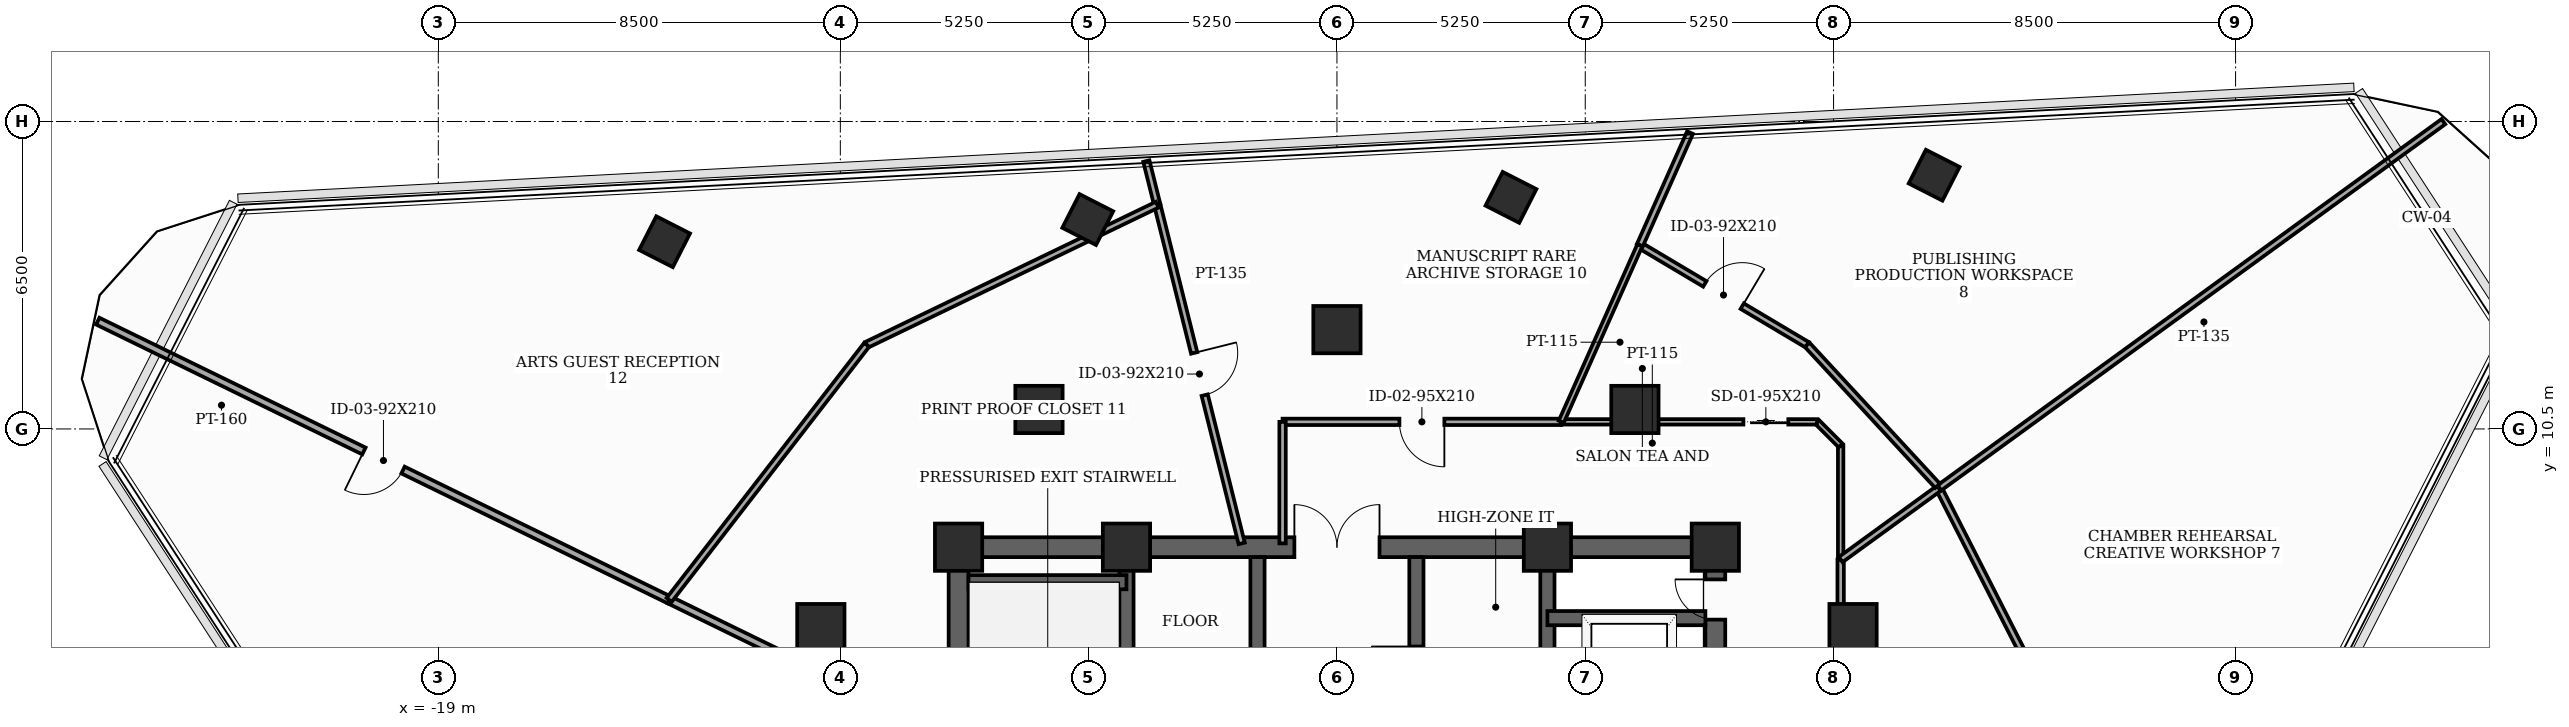
"""IFC4 building model, lengths in metres.
Left out: names, types, materials, properties, quantities, classifications, styles, units other than length and angle.
Written with IfcOpenShell. Run it as: python <this file> out.ifc"""

import sys

from ifc_helpers import new_model, si_unit, direction, frame, frame_2d, origin, origin_2d, place, context, subcontext, project, spatial, rectangle, extrude, element, fill, save


model = new_model("IFC4")
c1 = context("Model", 3, precision=1e-05, world=origin(), true_north=direction((0.0, 1.0)))
c2 = subcontext(c1, "Body", "Model", "MODEL_VIEW")
j1 = project(units=[si_unit("LENGTHUNIT", "METRE"), si_unit("PLANEANGLEUNIT", "RADIAN")], contexts=[c1])
p1 = place(None, origin())
s1 = spatial("IfcSite", under=j1, at=p1, CompositionType="ELEMENT")
p2 = place(p1, origin())
s2 = spatial("IfcBuilding", under=s1, at=p2, CompositionType="ELEMENT")
p3 = place(p2, frame((0.0, 0.0, 252.2)))
s3 = spatial("IfcBuildingStorey", under=s2, at=p3, CompositionType="ELEMENT", Elevation=252.2)
for number, where, z_axis, x_axis in (
    (1, (8.0, 8.0, 0.0), (0.0, 0.0, 1.0), (1.0, 0.0, 0.0)),
    (2, (4.45, 8.0, 0.0), (0.0, 0.0, 1.0), (1.0, 0.0, 0.0)),
    (3, (-4.45, 8.0, 0.0), (0.0, 0.0, 1.0), (1.0, 0.0, 0.0)),
    (4, (-8.0, 8.0, 0.0), (0.0, 0.0, 1.0), (1.0, 0.0, 0.0)),
    (5, (10.912, 6.3, 0.0), (0.0, 0.0, 1.0), (1.0, 0.0, 0.0)),
    (6, (6.3, 10.912, 0.0), (0.0, 0.0, 1.0), (1.0, 0.0, 0.0)),
    (7, (0.0, 12.6, 0.0), (0.0, 0.0, 1.0), (1.0, 0.0, 0.0)),
    (8, (-6.3, 10.912, 0.0), (0.0, 0.0, 1.0), (1.0, 0.0, 0.0)),
    (9, (-10.912, 6.3, 0.0), (0.0, 0.0, 1.0), (1.0, 0.0, 0.0)),
):
    element("IfcColumn", number, at=place(p3, frame(where, z_axis=z_axis, x_axis=x_axis)), inside=s3, PredefinedType="COLUMN", context=c2, shape_type="SweptSolid", body=[
        extrude(rectangle(XDim=1.0, YDim=1.0, at=origin_2d()), origin(), (0.0, 0.0, 1.0), 3.7),
    ])
for number, where, z_axis, x_axis in (
    (10, (12.627, 15.865, 0.0), (0.0, 0.0, 1.0), (0.454, 0.891, 0.0)),
    (11, (3.679, 15.396, 0.0), (0.0, 0.0, 1.0), (0.454, 0.891, 0.0)),
    (12, (-5.269, 14.927, 0.0), (0.0, 0.0, 1.0), (0.454, 0.891, 0.0)),
    (13, (-14.216, 14.458, 0.0), (0.0, 0.0, 1.0), (0.454, 0.891, 0.0)),
):
    element("IfcColumn", number, at=place(p3, frame(where, z_axis=z_axis, x_axis=x_axis)), inside=s3, PredefinedType="COLUMN", context=c2, shape_type="SweptSolid", body=[
        extrude(rectangle(XDim=0.8, YDim=0.8, at=origin_2d()), origin(), (0.0, 0.0, 1.0), 3.7),
    ])
p4 = place(p3, frame((-8.0, -8.0, 0.0), z_axis=(0.0, 0.0, 1.0), x_axis=(0.0, 1.0, 0.0)))
e14 = element("IfcWall", 14, at=p4, inside=s3, PredefinedType="SHEAR", context=c2, shape_type="SweptSolid", body=[
    extrude(rectangle(XDim=16.0, YDim=0.42, at=frame_2d((8.0, 0.0))), origin(), (0.0, 0.0, 1.0), 3.5),
])
p5 = place(p4, frame((0.681, 0.0, 0.0)))
e15 = element("IfcOpeningElement", 15, at=p5, cuts=e14, PredefinedType="OPENING", context=c2, shape_type="SweptSolid", body=[
    extrude(rectangle(XDim=0.85, YDim=2.02, at=frame_2d((0.425, 1.01))), frame((0.0, 0.22, 0.0), z_axis=(0.0, -1.0, 0.0), x_axis=(1.0, 0.0, 0.0)), (0.0, 0.0, 1.0), 0.44),
])
p6 = place(p4, frame((5.35, 0.0, 0.0)))
e16 = element("IfcOpeningElement", 16, at=p6, cuts=e14, PredefinedType="OPENING", context=c2, shape_type="SweptSolid", body=[
    extrude(rectangle(XDim=1.05, YDim=2.15, at=frame_2d((0.525, 1.075))), frame((0.0, 0.22, 0.0), z_axis=(0.0, -1.0, 0.0), x_axis=(1.0, 0.0, 0.0)), (0.0, 0.0, 1.0), 0.44),
])
p7 = place(p3, frame((8.0, -8.0, 0.0), z_axis=(0.0, 0.0, 1.0), x_axis=(0.0, 1.0, 0.0)))
e17 = element("IfcWall", 17, at=p7, inside=s3, PredefinedType="SHEAR", context=c2, shape_type="SweptSolid", body=[
    extrude(rectangle(XDim=16.0, YDim=0.42, at=frame_2d((8.0, 0.0))), origin(), (0.0, 0.0, 1.0), 3.5),
])
p8 = place(p7, frame((9.6, 0.0, 0.0)))
e18 = element("IfcOpeningElement", 18, at=p8, cuts=e17, PredefinedType="OPENING", context=c2, shape_type="SweptSolid", body=[
    extrude(rectangle(XDim=1.05, YDim=2.15, at=frame_2d((0.525, 1.075))), frame((0.0, 0.22, 0.0), z_axis=(0.0, -1.0, 0.0), x_axis=(1.0, 0.0, 0.0)), (0.0, 0.0, 1.0), 0.44),
])
p9 = place(p7, frame((14.469, 0.0, 0.0)))
e19 = element("IfcOpeningElement", 19, at=p9, cuts=e17, PredefinedType="OPENING", context=c2, shape_type="SweptSolid", body=[
    extrude(rectangle(XDim=0.85, YDim=2.02, at=frame_2d((0.425, 1.01))), frame((0.0, 0.22, 0.0), z_axis=(0.0, -1.0, 0.0), x_axis=(1.0, 0.0, 0.0)), (0.0, 0.0, 1.0), 0.44),
])
p10 = place(p3, frame((-8.0, 8.0, 0.0), z_axis=(0.0, 0.0, 1.0), x_axis=(1.0, 0.0, 0.0)))
e20 = element("IfcWall", 20, at=p10, inside=s3, PredefinedType="SHEAR", context=c2, shape_type="SweptSolid", body=[
    extrude(rectangle(XDim=16.0, YDim=0.42, at=frame_2d((8.0, 0.0))), origin(), (0.0, 0.0, 1.0), 3.5),
])
p11 = place(p10, frame((7.1, 0.0, 0.0)))
e21 = element("IfcOpeningElement", 21, at=p11, cuts=e20, PredefinedType="OPENING", context=c2, shape_type="SweptSolid", body=[
    extrude(rectangle(XDim=1.8, YDim=2.15, at=frame_2d((0.9, 1.075))), frame((0.0, 0.22, 0.0), z_axis=(0.0, -1.0, 0.0), x_axis=(1.0, 0.0, 0.0)), (0.0, 0.0, 1.0), 0.44),
])
for number, where, z_axis, x_axis in (
    (22, (-4.45, -7.79, 0.0), (0.0, 0.0, 1.0), (0.0, 1.0, 0.0)),
    (23, (4.45, -7.79, 0.0), (0.0, 0.0, 1.0), (0.0, 1.0, 0.0)),
):
    element("IfcWall", number, at=place(p3, frame(where, z_axis=z_axis, x_axis=x_axis)), inside=s3, PredefinedType="SHEAR", context=c2, shape_type="SweptSolid", body=[
        extrude(rectangle(XDim=15.58, YDim=0.3, at=frame_2d((7.79, 0.0))), origin(), (0.0, 0.0, 1.0), 3.5),
    ])
for number, where, z_axis, x_axis in (
    (24, (-7.79, 7.26, 0.0), (0.0, 0.0, 1.0), (1.0, 0.0, 0.0)),
    (25, (4.45, 6.5, 0.0), (0.0, 0.0, 1.0), (1.0, 0.0, 0.0)),
):
    element("IfcWall", number, at=place(p3, frame(where, z_axis=z_axis, x_axis=x_axis)), inside=s3, PredefinedType="SHEAR", context=c2, shape_type="SweptSolid", body=[
        extrude(rectangle(XDim=3.34, YDim=0.3, at=frame_2d((1.67, 0.0))), origin(), (0.0, 0.0, 1.0), 3.5),
    ])
p12 = place(p3, frame((-1.68, -4.85, 0.0), z_axis=(0.0, 0.0, 1.0), x_axis=(0.0, 1.0, 0.0)))
e26 = element("IfcWall", 26, at=p12, inside=s3, PredefinedType="SHEAR", context=c2, shape_type="SweptSolid", body=[
    extrude(rectangle(XDim=12.64, YDim=0.3, at=frame_2d((6.32, 0.0))), origin(), (0.0, 0.0, 1.0), 3.5),
])
p13 = place(p12, frame((2.6, 0.0, 0.0)))
e27 = element("IfcOpeningElement", 27, at=p13, cuts=e26, PredefinedType="OPENING", context=c2, shape_type="SweptSolid", body=[
    extrude(rectangle(XDim=0.95, YDim=2.1, at=frame_2d((0.475, 1.05))), frame((0.0, 0.16, 0.0), z_axis=(0.0, -1.0, 0.0), x_axis=(1.0, 0.0, 0.0)), (0.0, 0.0, 1.0), 0.32),
])
p14 = place(p12, frame((8.8, 0.0, 0.0)))
e28 = element("IfcOpeningElement", 28, at=p14, cuts=e26, PredefinedType="OPENING", context=c2, shape_type="SweptSolid", body=[
    extrude(rectangle(XDim=0.95, YDim=2.1, at=frame_2d((0.475, 1.05))), frame((0.0, 0.16, 0.0), z_axis=(0.0, -1.0, 0.0), x_axis=(1.0, 0.0, 0.0)), (0.0, 0.0, 1.0), 0.32),
])
p15 = place(p3, frame((1.68, -4.85, 0.0), z_axis=(0.0, 0.0, 1.0), x_axis=(0.0, 1.0, 0.0)))
e29 = element("IfcWall", 29, at=p15, inside=s3, PredefinedType="SHEAR", context=c2, shape_type="SweptSolid", body=[
    extrude(rectangle(XDim=12.64, YDim=0.3, at=frame_2d((6.32, 0.0))), origin(), (0.0, 0.0, 1.0), 3.5),
])
p16 = place(p15, frame((0.55, 0.0, 0.0)))
e30 = element("IfcOpeningElement", 30, at=p16, cuts=e29, PredefinedType="OPENING", context=c2, shape_type="SweptSolid", body=[
    extrude(rectangle(XDim=1.1, YDim=2.1, at=frame_2d((0.55, 1.05))), frame((0.0, 0.16, 0.0), z_axis=(0.0, -1.0, 0.0), x_axis=(1.0, 0.0, 0.0)), (0.0, 0.0, 1.0), 0.32),
])
p17 = place(p15, frame((2.65, 0.0, 0.0)))
e31 = element("IfcOpeningElement", 31, at=p17, cuts=e29, PredefinedType="OPENING", context=c2, shape_type="SweptSolid", body=[
    extrude(rectangle(XDim=1.1, YDim=2.1, at=frame_2d((0.55, 1.05))), frame((0.0, 0.16, 0.0), z_axis=(0.0, -1.0, 0.0), x_axis=(1.0, 0.0, 0.0)), (0.0, 0.0, 1.0), 0.32),
])
p18 = place(p15, frame((4.75, 0.0, 0.0)))
e32 = element("IfcOpeningElement", 32, at=p18, cuts=e29, PredefinedType="OPENING", context=c2, shape_type="SweptSolid", body=[
    extrude(rectangle(XDim=1.1, YDim=2.1, at=frame_2d((0.55, 1.05))), frame((0.0, 0.16, 0.0), z_axis=(0.0, -1.0, 0.0), x_axis=(1.0, 0.0, 0.0)), (0.0, 0.0, 1.0), 0.32),
])
p19 = place(p15, frame((6.8, 0.0, 0.0)))
e33 = element("IfcOpeningElement", 33, at=p19, cuts=e29, PredefinedType="OPENING", context=c2, shape_type="SweptSolid", body=[
    extrude(rectangle(XDim=0.92, YDim=2.1, at=frame_2d((0.46, 1.05))), frame((0.0, 0.16, 0.0), z_axis=(0.0, -1.0, 0.0), x_axis=(1.0, 0.0, 0.0)), (0.0, 0.0, 1.0), 0.32),
])
p20 = place(p15, frame((9.8, 0.0, 0.0)))
e34 = element("IfcOpeningElement", 34, at=p20, cuts=e29, PredefinedType="OPENING", context=c2, shape_type="SweptSolid", body=[
    extrude(rectangle(XDim=0.95, YDim=2.1, at=frame_2d((0.475, 1.05))), frame((0.0, 0.16, 0.0), z_axis=(0.0, -1.0, 0.0), x_axis=(1.0, 0.0, 0.0)), (0.0, 0.0, 1.0), 0.32),
])
p21 = place(p3, frame((10.65, 4.225, 0.0), z_axis=(0.0, 0.0, 1.0), x_axis=(0.0, 1.0, 0.0)))
e35 = element("IfcWall", 35, at=p21, inside=s3, PredefinedType="PARTITIONING", context=c2, shape_type="SweptSolid", body=[
    extrude(rectangle(XDim=3.513, YDim=0.135, at=frame_2d((1.756, 0.0))), origin(), (0.0, 0.0, 1.0), 2.885),
])
p22 = place(p3, frame((10.65, 7.738, 0.0), z_axis=(0.0, 0.0, 1.0), x_axis=(0.0, 1.0, 0.0)))
e36 = element("IfcWall", 36, at=p22, inside=s3, PredefinedType="PARTITIONING", context=c2, shape_type="SweptSolid", body=[
    extrude(rectangle(XDim=2.412, YDim=0.115, at=frame_2d((1.206, 0.0))), origin(), (0.0, 0.0, 1.0), 3.5),
])
p23 = place(p3, frame((10.65, 10.15, 0.0), z_axis=(0.0, 0.0, 1.0), x_axis=(-0.707106781187, 0.707106781187, 0.0)))
e37 = element("IfcWall", 37, at=p23, inside=s3, PredefinedType="PARTITIONING", context=c2, shape_type="SweptSolid", body=[
    extrude(rectangle(XDim=0.707, YDim=0.115, at=frame_2d((0.354, 0.0))), origin(), (0.0, 0.0, 1.0), 3.5),
])
p24 = place(p3, frame((10.15, 10.65, 0.0), z_axis=(0.0, 0.0, 1.0), x_axis=(-1.0, 0.0, 0.0)))
e38 = element("IfcWall", 38, at=p24, inside=s3, PredefinedType="PARTITIONING", context=c2, shape_type="SweptSolid", body=[
    extrude(rectangle(XDim=5.408, YDim=0.115, at=frame_2d((2.704, 0.0))), origin(), (0.0, 0.0, 1.0), 2.885),
])
p25 = place(p24, frame((0.607, 0.0, 0.0)))
e39 = element("IfcOpeningElement", 39, at=p25, cuts=e38, PredefinedType="OPENING", context=c2, shape_type="SweptSolid", body=[
    extrude(rectangle(XDim=0.95, YDim=2.1, at=frame_2d((0.475, 1.05))), frame((0.0, 0.067, 0.0), z_axis=(0.0, -1.0, 0.0), x_axis=(1.0, 0.0, 0.0)), (0.0, 0.0, 1.0), 0.135),
])
p26 = place(p3, frame((4.742, 10.65, 0.0), z_axis=(0.0, 0.0, 1.0), x_axis=(-1.0, 0.0, 0.0)))
e40 = element("IfcWall", 40, at=p26, inside=s3, PredefinedType="PARTITIONING", context=c2, shape_type="SweptSolid", body=[
    extrude(rectangle(XDim=5.892, YDim=0.135, at=frame_2d((2.946, 0.0))), origin(), (0.0, 0.0, 1.0), 2.885),
])
p27 = place(p26, frame((2.471, 0.0, 0.0)))
e41 = element("IfcOpeningElement", 41, at=p27, cuts=e40, PredefinedType="OPENING", context=c2, shape_type="SweptSolid", body=[
    extrude(rectangle(XDim=0.95, YDim=2.1, at=frame_2d((0.475, 1.05))), frame((0.0, 0.077, 0.0), z_axis=(0.0, -1.0, 0.0), x_axis=(1.0, 0.0, 0.0)), (0.0, 0.0, 1.0), 0.155),
])
p28 = place(p3, frame((-1.15, 10.65, 0.0), z_axis=(0.0, 0.0, 1.0), x_axis=(0.0, -1.0, 0.0)))
e42 = element("IfcWall", 42, at=p28, inside=s3, PredefinedType="PARTITIONING", context=c2, shape_type="SweptSolid", body=[
    extrude(rectangle(XDim=2.57, YDim=0.135, at=frame_2d((1.285, 0.0))), origin(), (0.0, 0.0, 1.0), 2.885),
])
p29 = place(p3, frame((-8.08, 3.941, 0.0), z_axis=(0.0, 0.0, 1.0), x_axis=(-0.898794985177, 0.438369221798, 0.0)))
e43 = element("IfcWall", 43, at=p29, inside=s3, PredefinedType="PARTITIONING", context=c2, shape_type="SweptSolid", body=[
    extrude(rectangle(XDim=6.719, YDim=0.16, at=frame_2d((3.359, 0.0))), origin(), (0.0, 0.0, 1.0), 2.885),
])
p30 = place(p3, frame((-14.119, 6.886, 0.0), z_axis=(0.0, 0.0, 1.0), x_axis=(-0.898768620199, 0.438423274184, 0.0)))
e44 = element("IfcWall", 44, at=p30, inside=s3, PredefinedType="PARTITIONING", context=c2, shape_type="SweptSolid", body=[
    extrude(rectangle(XDim=13.442, YDim=0.16, at=frame_2d((6.721, 0.0))), origin(), (0.0, 0.0, 1.0), 3.035),
])
p31 = place(p30, frame((6.261, 0.0, 0.0)))
e45 = element("IfcOpeningElement", 45, at=p31, cuts=e44, PredefinedType="OPENING", context=c2, shape_type="SweptSolid", body=[
    extrude(rectangle(XDim=0.92, YDim=2.1, at=frame_2d((0.46, 1.05))), frame((0.0, 0.09, 0.0), z_axis=(0.0, -1.0, 0.0), x_axis=(1.0, 0.0, 0.0)), (0.0, 0.0, 1.0), 0.18),
])
p32 = place(p3, frame((15.149, 4.487, 0.0), z_axis=(0.0, 0.0, 1.0), x_axis=(-0.453912768225, 0.891046126102, 0.0)))
e46 = element("IfcWall", 46, at=p32, inside=s3, PredefinedType="PARTITIONING", context=c2, shape_type="SweptSolid", body=[
    extrude(rectangle(XDim=5.34, YDim=0.135, at=frame_2d((2.67, 0.0))), origin(), (0.0, 0.0, 1.0), 3.185),
])
p33 = place(p3, frame((12.725, 9.245, 0.0), z_axis=(0.0, 0.0, 1.0), x_axis=(-0.809135191367, -0.587622533683, 0.0)))
e47 = element("IfcWall", 47, at=p33, inside=s3, PredefinedType="PARTITIONING", context=c2, shape_type="SweptSolid", body=[
    extrude(rectangle(XDim=2.565, YDim=0.135, at=frame_2d((1.282, 0.0))), origin(), (0.0, 0.0, 1.0), 3.185),
])
p34 = place(p3, frame((23.394, 16.997, 0.0), z_axis=(0.0, 0.0, 1.0), x_axis=(-0.80901413128, -0.587789192985, 0.0)))
e48 = element("IfcWall", 48, at=p34, inside=s3, PredefinedType="PARTITIONING", context=c2, shape_type="SweptSolid", body=[
    extrude(rectangle(XDim=13.171, YDim=0.135, at=frame_2d((6.586, 0.0))), origin(), (0.0, 0.0, 1.0), 3.035),
])
p35 = place(p3, frame((6.404, 14.384, 0.0), z_axis=(0.0, 0.0, 1.0), x_axis=(0.859464079119, -0.511196143085, 0.0)))
e49 = element("IfcWall", 49, at=p35, inside=s3, PredefinedType="PARTITIONING", context=c2, shape_type="SweptSolid", body=[
    extrude(rectangle(XDim=4.118, YDim=0.135, at=frame_2d((2.059, 0.0))), origin(), (0.0, 0.0, 1.0), 3.035),
])
p36 = place(p35, frame((1.599, 0.0, 0.0)))
e50 = element("IfcOpeningElement", 50, at=p36, cuts=e49, PredefinedType="OPENING", context=c2, shape_type="SweptSolid", body=[
    extrude(rectangle(XDim=0.92, YDim=2.1, at=frame_2d((0.46, 1.05))), frame((0.0, 0.077, 0.0), z_axis=(0.0, -1.0, 0.0), x_axis=(1.0, 0.0, 0.0)), (0.0, 0.0, 1.0), 0.155),
])
p37 = place(p3, frame((9.943, 12.279, 0.0), z_axis=(0.0, 0.0, 1.0), x_axis=(0.678829604912, -0.734295831049, 0.0)))
e51 = element("IfcWall", 51, at=p37, inside=s3, PredefinedType="PARTITIONING", context=c2, shape_type="SweptSolid", body=[
    extrude(rectangle(XDim=4.058, YDim=0.135, at=frame_2d((2.029, 0.0))), origin(), (0.0, 0.0, 1.0), 3.185),
])
p38 = place(p3, frame((7.465, 16.766, 0.0), z_axis=(0.0, 0.0, 1.0), x_axis=(-0.406928703069, -0.913459922831, 0.0)))
e52 = element("IfcWall", 52, at=p38, inside=s3, PredefinedType="PARTITIONING", context=c2, shape_type="SweptSolid", body=[
    extrude(rectangle(XDim=2.608, YDim=0.135, at=frame_2d((1.304, 0.0))), origin(), (0.0, 0.0, 1.0), 3.035),
])
p39 = place(p3, frame((6.404, 14.384, 0.0), z_axis=(0.0, 0.0, 1.0), x_axis=(-0.406648271104, -0.913584798258, 0.0)))
e53 = element("IfcWall", 53, at=p39, inside=s3, PredefinedType="PARTITIONING", context=c2, shape_type="SweptSolid", body=[
    extrude(rectangle(XDim=4.087, YDim=0.115, at=frame_2d((2.044, 0.0))), origin(), (0.0, 0.0, 1.0), 2.885),
])
p40 = place(p3, frame((-3.8, 15.242, 0.0), z_axis=(0.0, 0.0, 1.0), x_axis=(0.241889603588, -0.970303777008, 0.0)))
e54 = element("IfcWall", 54, at=p40, inside=s3, PredefinedType="PARTITIONING", context=c2, shape_type="SweptSolid", body=[
    extrude(rectangle(XDim=7.381, YDim=0.135, at=frame_2d((3.69, 0.0))), origin(), (0.0, 0.0, 1.0), 2.885),
])
p41 = place(p40, frame((3.231, 0.0, 0.0)))
e55 = element("IfcOpeningElement", 55, at=p41, cuts=e54, PredefinedType="OPENING", context=c2, shape_type="SweptSolid", body=[
    extrude(rectangle(XDim=0.92, YDim=2.1, at=frame_2d((0.46, 1.05))), frame((0.0, 0.077, 0.0), z_axis=(0.0, -1.0, 0.0), x_axis=(1.0, 0.0, 0.0)), (0.0, 0.0, 1.0), 0.155),
])
p42 = place(p3, frame((-4.03, 16.164, 0.0), z_axis=(0.0, 0.0, 1.0), x_axis=(0.241809991188, -0.970323620326, 0.0)))
e56 = element("IfcWall", 56, at=p42, inside=s3, PredefinedType="PARTITIONING", context=c2, shape_type="SweptSolid", body=[
    extrude(rectangle(XDim=0.95, YDim=0.135, at=frame_2d((0.475, 0.0))), origin(), (0.0, 0.0, 1.0), 3.5),
])
p43 = place(p3, frame((-3.8, 15.242, 0.0), z_axis=(0.0, 0.0, 1.0), x_axis=(-0.900708156853, -0.434424695635, 0.0)))
e57 = element("IfcWall", 57, at=p43, inside=s3, PredefinedType="PARTITIONING", context=c2, shape_type="SweptSolid", body=[
    extrude(rectangle(XDim=6.82, YDim=0.135, at=frame_2d((3.41, 0.0))), origin(), (0.0, 0.0, 1.0), 3.035),
])
p44 = place(p3, frame((-9.943, 12.279, 0.0), z_axis=(0.0, 0.0, 1.0), x_axis=(-0.612219395693, -0.790687935621, 0.0)))
e58 = element("IfcWall", 58, at=p44, inside=s3, PredefinedType="PARTITIONING", context=c2, shape_type="SweptSolid", body=[
    extrude(rectangle(XDim=6.821, YDim=0.135, at=frame_2d((3.41, 0.0))), origin(), (0.0, 0.0, 1.0), 3.185),
])
p45 = place(p9, origin())
e59 = element("IfcDoor", 59, at=p45, inside=s3, OperationType="SINGLE_SWING_RIGHT", PredefinedType="TRAPDOOR", context=c2, shape_type="SweptSolid", body=[
    extrude(rectangle(XDim=0.85, YDim=2.02, at=frame_2d((0.425, 1.01))), frame((0.0, 0.025, 0.0), z_axis=(0.0, -1.0, 0.0), x_axis=(1.0, 0.0, 0.0)), (0.0, 0.0, 1.0), 0.05),
])
fill(e19, e59)
p46 = place(p11, origin())
e60 = element("IfcDoor", 60, at=p46, inside=s3, OperationType="DOUBLE_DOOR_SINGLE_SWING", PredefinedType="DOOR", context=c2, shape_type="SweptSolid", body=[
    extrude(rectangle(XDim=1.8, YDim=2.15, at=frame_2d((0.9, 1.075))), frame((0.0, 0.025, 0.0), z_axis=(0.0, -1.0, 0.0), x_axis=(1.0, 0.0, 0.0)), (0.0, 0.0, 1.0), 0.05),
])
fill(e21, e60)
p47 = place(p20, origin())
e61 = element("IfcDoor", 61, at=p47, inside=s3, OperationType="SINGLE_SWING_RIGHT", PredefinedType="DOOR", context=c2, shape_type="SweptSolid", body=[
    extrude(rectangle(XDim=0.95, YDim=2.1, at=frame_2d((0.475, 1.05))), frame((0.0, 0.025, 0.0), z_axis=(0.0, -1.0, 0.0), x_axis=(1.0, 0.0, 0.0)), (0.0, 0.0, 1.0), 0.05),
])
fill(e34, e61)
p48 = place(p25, origin())
e62 = element("IfcDoor", 62, at=p48, inside=s3, OperationType="SLIDING_TO_LEFT", PredefinedType="DOOR", context=c2, shape_type="SweptSolid", body=[
    extrude(rectangle(XDim=0.95, YDim=2.1, at=frame_2d((0.475, 1.05))), frame((0.0, 0.025, 0.0), z_axis=(0.0, -1.0, 0.0), x_axis=(1.0, 0.0, 0.0)), (0.0, 0.0, 1.0), 0.05),
])
fill(e39, e62)
p49 = place(p27, origin())
e63 = element("IfcDoor", 63, at=p49, inside=s3, OperationType="SINGLE_SWING_LEFT", PredefinedType="DOOR", context=c2, shape_type="SweptSolid", body=[
    extrude(rectangle(XDim=0.95, YDim=2.1, at=frame_2d((0.475, 1.05))), frame((0.0, 0.025, 0.0), z_axis=(0.0, -1.0, 0.0), x_axis=(1.0, 0.0, 0.0)), (0.0, 0.0, 1.0), 0.05),
])
fill(e41, e63)
p50 = place(p31, origin())
e64 = element("IfcDoor", 64, at=p50, inside=s3, OperationType="SINGLE_SWING_RIGHT", PredefinedType="DOOR", context=c2, shape_type="SweptSolid", body=[
    extrude(rectangle(XDim=0.92, YDim=2.1, at=frame_2d((0.46, 1.05))), frame((0.0, 0.025, 0.0), z_axis=(0.0, -1.0, 0.0), x_axis=(1.0, 0.0, 0.0)), (0.0, 0.0, 1.0), 0.05),
])
fill(e45, e64)
p51 = place(p36, origin())
e65 = element("IfcDoor", 65, at=p51, inside=s3, OperationType="SINGLE_SWING_RIGHT", PredefinedType="DOOR", context=c2, shape_type="SweptSolid", body=[
    extrude(rectangle(XDim=0.92, YDim=2.1, at=frame_2d((0.46, 1.05))), frame((0.0, 0.025, 0.0), z_axis=(0.0, -1.0, 0.0), x_axis=(1.0, 0.0, 0.0)), (0.0, 0.0, 1.0), 0.05),
])
fill(e50, e65)
p52 = place(p41, origin())
e66 = element("IfcDoor", 66, at=p52, inside=s3, OperationType="SINGLE_SWING_LEFT", PredefinedType="DOOR", context=c2, shape_type="SweptSolid", body=[
    extrude(rectangle(XDim=0.92, YDim=2.1, at=frame_2d((0.46, 1.05))), frame((0.0, 0.025, 0.0), z_axis=(0.0, -1.0, 0.0), x_axis=(1.0, 0.0, 0.0)), (0.0, 0.0, 1.0), 0.05),
])
fill(e55, e66)
save(model, sys.argv[1])
